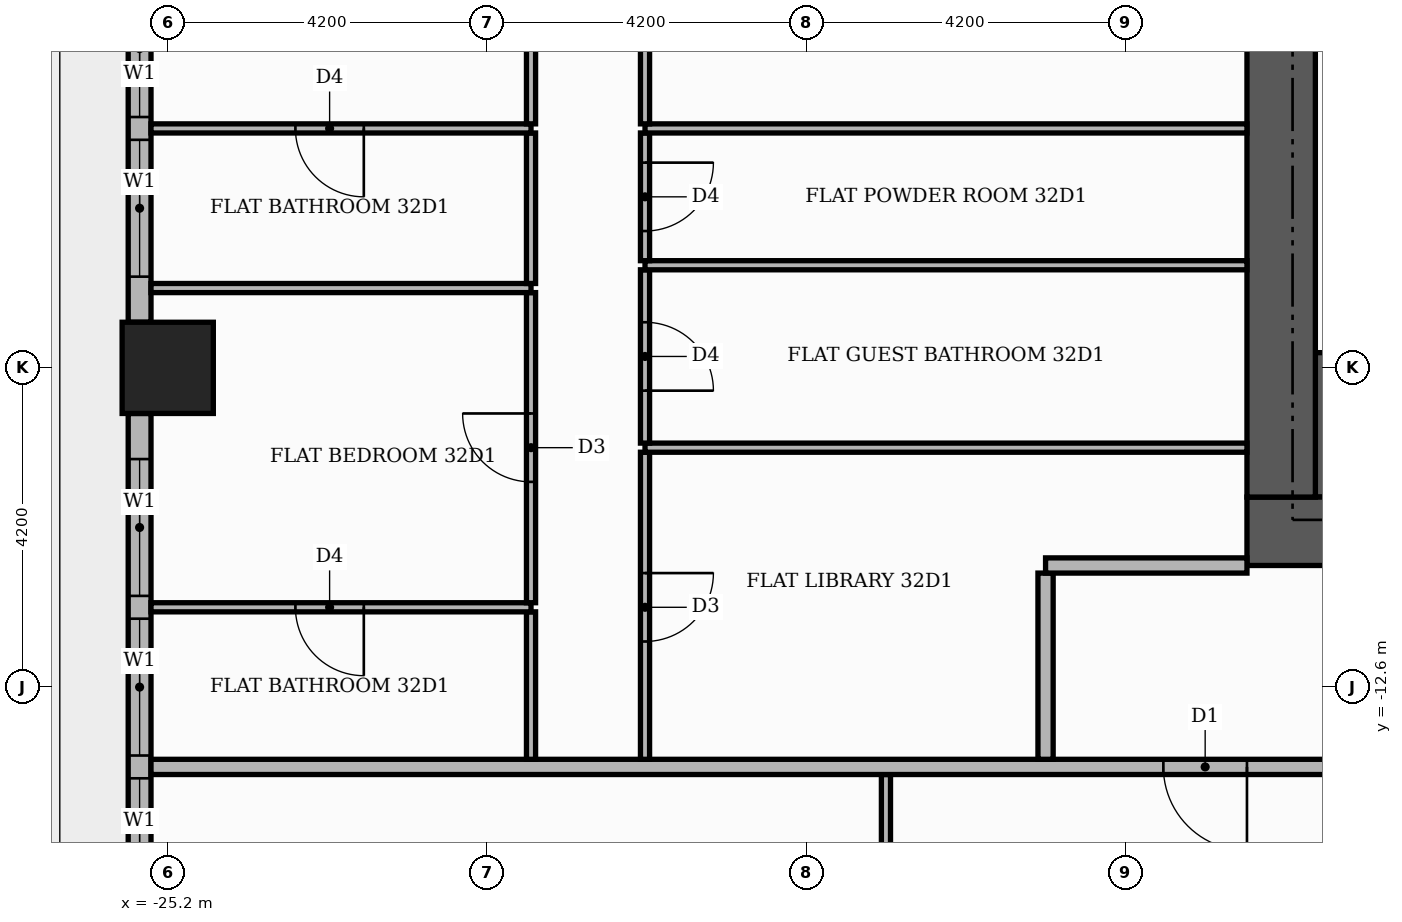
"""IFC4 building model, lengths in metres.
Left out: names, types, materials, properties, quantities, classifications, styles, units other than length and angle.
Written with IfcOpenShell. Run it as: python <this file> out.ifc"""

import sys

from ifc_helpers import new_model, si_unit, direction, frame, frame_2d, origin, origin_2d, place, context, subcontext, project, spatial, rectangle, extrude, element, fill, save


model = new_model("IFC4")
c1 = context("Model", 3, precision=1e-05, world=origin(), true_north=direction((0.0, 1.0)))
c2 = subcontext(c1, "Body", "Model", "MODEL_VIEW")
j1 = project(units=[si_unit("LENGTHUNIT", "METRE"), si_unit("PLANEANGLEUNIT", "RADIAN")], contexts=[c1])
p1 = place(None, origin())
s1 = spatial("IfcSite", under=j1, at=p1, CompositionType="ELEMENT")
p2 = place(p1, origin())
s2 = spatial("IfcBuilding", under=s1, at=p2, CompositionType="ELEMENT")
p3 = place(p2, frame((0.0, 0.0, 137.7)))
s3 = spatial("IfcBuildingStorey", under=s2, at=p3, CompositionType="ELEMENT", Elevation=137.7)
p4 = place(p3, frame((-10.1, -9.15, 0.0), z_axis=(0.0, 0.0, 1.0), x_axis=(1.0, 0.0, 0.0)))
e1 = element("IfcWall", 1, at=p4, inside=s3, PredefinedType="SHEAR", context=c2, shape_type="SweptSolid", body=[
    extrude(rectangle(XDim=4.6, YDim=1.9, at=frame_2d((2.3, 0.0))), origin(), (0.0, 0.0, 1.0), 3.48),
])
p5 = place(p3, frame((-11.0, -10.55, 0.0), z_axis=(0.0, 0.0, 1.0), x_axis=(1.0, 0.0, 0.0)))
e2 = element("IfcWall", 2, at=p5, inside=s3, PredefinedType="SHEAR", context=c2, shape_type="SweptSolid", body=[
    extrude(rectangle(XDim=22.0, YDim=0.9, at=frame_2d((11.0, 0.0))), origin(), (0.0, 0.0, 1.0), 3.48),
])
p6 = place(p5, frame((7.4, 0.0, 0.0)))
e3 = element("IfcOpeningElement", 3, at=p6, cuts=e2, PredefinedType="OPENING", context=c2, shape_type="SweptSolid", body=[
    extrude(rectangle(XDim=1.8, YDim=2.2, at=frame_2d((0.9, 1.1))), frame((0.0, 0.46, 0.0), z_axis=(0.0, -1.0, 0.0), x_axis=(1.0, 0.0, 0.0)), (0.0, 0.0, 1.0), 0.92),
])
p7 = place(p3, frame((-10.55, -10.1, 0.0), z_axis=(0.0, 0.0, 1.0), x_axis=(0.0, 1.0, 0.0)))
e4 = element("IfcWall", 4, at=p7, inside=s3, PredefinedType="SHEAR", context=c2, shape_type="SweptSolid", body=[
    extrude(rectangle(XDim=20.2, YDim=0.9, at=frame_2d((10.1, 0.0))), origin(), (0.0, 0.0, 1.0), 3.48),
])
p8 = place(p3, frame((-25.2, -8.4, 0.0), z_axis=(0.0, 0.0, 1.0), x_axis=(1.0, 0.0, 0.0)))
e5 = element("IfcColumn", 5, at=p8, inside=s3, PredefinedType="COLUMN", context=c2, shape_type="SweptSolid", body=[
    extrude(rectangle(XDim=1.2, YDim=1.2, at=origin_2d()), origin(), (0.0, 0.0, 1.0), 3.9),
])
p9 = place(p3, frame((-25.57, -0.6, 0.0), z_axis=(0.0, 0.0, 1.0), x_axis=(0.0, -1.0, 0.0)))
e6 = element("IfcWall", 6, at=p9, inside=s3, PredefinedType="STANDARD", context=c2, shape_type="SweptSolid", body=[
    extrude(rectangle(XDim=7.2, YDim=0.3, at=frame_2d((3.6, 0.0))), origin(), (0.0, 0.0, 1.0), 3.48),
])
p10 = place(p9, frame((0.6, 0.0, 0.0)))
e7 = element("IfcOpeningElement", 7, at=p10, cuts=e6, PredefinedType="OPENING", context=c2, shape_type="SweptSolid", body=[
    extrude(rectangle(XDim=1.8, YDim=2.4, at=frame_2d((0.9, 1.2))), frame((0.0, 0.16, 0.0), z_axis=(0.0, -1.0, 0.0), x_axis=(1.0, 0.0, 0.0)), (0.0, 0.0, 1.0), 0.32),
])
p11 = place(p9, frame((2.7, 0.0, 0.9)))
e8 = element("IfcOpeningElement", 8, at=p11, cuts=e6, PredefinedType="OPENING", context=c2, shape_type="SweptSolid", body=[
    extrude(rectangle(XDim=1.8, YDim=2.1, at=frame_2d((0.9, 1.05))), frame((0.0, 0.16, 0.0), z_axis=(0.0, -1.0, 0.0), x_axis=(1.0, 0.0, 0.0)), (0.0, 0.0, 1.0), 0.32),
])
p12 = place(p9, frame((4.8, 0.0, 0.9)))
e9 = element("IfcOpeningElement", 9, at=p12, cuts=e6, PredefinedType="OPENING", context=c2, shape_type="SweptSolid", body=[
    extrude(rectangle(XDim=1.8, YDim=2.1, at=frame_2d((0.9, 1.05))), frame((0.0, 0.16, 0.0), z_axis=(0.0, -1.0, 0.0), x_axis=(1.0, 0.0, 0.0)), (0.0, 0.0, 1.0), 0.32),
])
p13 = place(p3, frame((-25.57, -9.0, 0.0), z_axis=(0.0, 0.0, 1.0), x_axis=(0.0, -1.0, 0.0)))
e10 = element("IfcWall", 10, at=p13, inside=s3, PredefinedType="STANDARD", context=c2, shape_type="SweptSolid", body=[
    extrude(rectangle(XDim=7.2, YDim=0.3, at=frame_2d((3.6, 0.0))), origin(), (0.0, 0.0, 1.0), 3.48),
])
p14 = place(p13, frame((0.6, 0.0, 0.9)))
e11 = element("IfcOpeningElement", 11, at=p14, cuts=e10, PredefinedType="OPENING", context=c2, shape_type="SweptSolid", body=[
    extrude(rectangle(XDim=1.8, YDim=2.1, at=frame_2d((0.9, 1.05))), frame((0.0, 0.16, 0.0), z_axis=(0.0, -1.0, 0.0), x_axis=(1.0, 0.0, 0.0)), (0.0, 0.0, 1.0), 0.32),
])
p15 = place(p13, frame((2.7, 0.0, 0.9)))
e12 = element("IfcOpeningElement", 12, at=p15, cuts=e10, PredefinedType="OPENING", context=c2, shape_type="SweptSolid", body=[
    extrude(rectangle(XDim=1.8, YDim=2.1, at=frame_2d((0.9, 1.05))), frame((0.0, 0.16, 0.0), z_axis=(0.0, -1.0, 0.0), x_axis=(1.0, 0.0, 0.0)), (0.0, 0.0, 1.0), 0.32),
])
p16 = place(p13, frame((4.8, 0.0, 0.9)))
e13 = element("IfcOpeningElement", 13, at=p16, cuts=e10, PredefinedType="OPENING", context=c2, shape_type="SweptSolid", body=[
    extrude(rectangle(XDim=1.8, YDim=2.1, at=frame_2d((0.9, 1.05))), frame((0.0, 0.16, 0.0), z_axis=(0.0, -1.0, 0.0), x_axis=(1.0, 0.0, 0.0)), (0.0, 0.0, 1.0), 0.32),
])
p17 = place(p3, frame((-15.75, -19.76, 0.0), z_axis=(0.0, 0.0, 1.0), x_axis=(0.0, 1.0, 0.0)))
e14 = element("IfcWall", 14, at=p17, inside=s3, PredefinedType="PARTITIONING", context=c2, shape_type="SweptSolid", body=[
    extrude(rectangle(XDim=6.01, YDim=0.12, at=frame_2d((3.005, 0.0))), origin(), (0.0, 0.0, 1.0), 3.48),
])
p18 = place(p17, frame((2.525, 0.0, 0.0)))
e15 = element("IfcOpeningElement", 15, at=p18, cuts=e14, PredefinedType="OPENING", context=c2, shape_type="SweptSolid", body=[
    extrude(rectangle(XDim=1.0, YDim=2.1, at=frame_2d((0.5, 1.05))), frame((0.0, 0.07, 0.0), z_axis=(0.0, -1.0, 0.0), x_axis=(1.0, 0.0, 0.0)), (0.0, 0.0, 1.0), 0.14),
])
p19 = place(p3, frame((-25.42, -13.65, 0.0), z_axis=(0.0, 0.0, 1.0), x_axis=(1.0, 0.0, 0.0)))
e16 = element("IfcWall", 16, at=p19, inside=s3, PredefinedType="PARTITIONING", context=c2, shape_type="SweptSolid", body=[
    extrude(rectangle(XDim=39.07, YDim=0.2, at=frame_2d((19.535, 0.0))), origin(), (0.0, 0.0, 1.0), 3.48),
])
p20 = place(p19, frame((13.32, 0.0, 0.0)))
e17 = element("IfcOpeningElement", 17, at=p20, cuts=e16, PredefinedType="OPENING", context=c2, shape_type="SweptSolid", body=[
    extrude(rectangle(XDim=1.1, YDim=2.4, at=frame_2d((0.55, 1.2))), frame((0.0, 0.11, 0.0), z_axis=(0.0, -1.0, 0.0), x_axis=(1.0, 0.0, 0.0)), (0.0, 0.0, 1.0), 0.22),
])
p21 = place(p19, frame((25.92, 0.0, 0.0)))
e18 = element("IfcOpeningElement", 18, at=p21, cuts=e16, PredefinedType="OPENING", context=c2, shape_type="SweptSolid", body=[
    extrude(rectangle(XDim=1.1, YDim=2.4, at=frame_2d((0.55, 1.2))), frame((0.0, 0.11, 0.0), z_axis=(0.0, -1.0, 0.0), x_axis=(1.0, 0.0, 0.0)), (0.0, 0.0, 1.0), 0.22),
])
p22 = place(p3, frame((-20.42, -13.55, 0.0), z_axis=(0.0, 0.0, 1.0), x_axis=(0.0, 1.0, 0.0)))
e19 = element("IfcWall", 19, at=p22, inside=s3, PredefinedType="PARTITIONING", context=c2, shape_type="SweptSolid", body=[
    extrude(rectangle(XDim=1.94, YDim=0.12, at=frame_2d((0.97, 0.0))), origin(), (0.0, 0.0, 1.0), 3.48),
])
p23 = place(p3, frame((-18.92, -13.55, 0.0), z_axis=(0.0, 0.0, 1.0), x_axis=(0.0, 1.0, 0.0)))
e20 = element("IfcWall", 20, at=p23, inside=s3, PredefinedType="PARTITIONING", context=c2, shape_type="SweptSolid", body=[
    extrude(rectangle(XDim=4.04, YDim=0.12, at=frame_2d((2.02, 0.0))), origin(), (0.0, 0.0, 1.0), 3.48),
])
p24 = place(p23, frame((1.55, 0.0, 0.0)))
e21 = element("IfcOpeningElement", 21, at=p24, cuts=e20, PredefinedType="OPENING", context=c2, shape_type="SweptSolid", body=[
    extrude(rectangle(XDim=0.9, YDim=2.1, at=frame_2d((0.45, 1.05))), frame((0.0, 0.07, 0.0), z_axis=(0.0, -1.0, 0.0), x_axis=(1.0, 0.0, 0.0)), (0.0, 0.0, 1.0), 0.14),
])
p25 = place(p3, frame((-13.65, -13.55, 0.0), z_axis=(0.0, 0.0, 1.0), x_axis=(0.0, 1.0, 0.0)))
e22 = element("IfcWall", 22, at=p25, inside=s3, PredefinedType="PARTITIONING", context=c2, shape_type="SweptSolid", body=[
    extrude(rectangle(XDim=2.45, YDim=0.2, at=frame_2d((1.225, 0.0))), origin(), (0.0, 0.0, 1.0), 3.48),
])
p26 = place(p3, frame((-25.42, -11.55, 0.0), z_axis=(0.0, 0.0, 1.0), x_axis=(1.0, 0.0, 0.0)))
e23 = element("IfcWall", 23, at=p26, inside=s3, PredefinedType="PARTITIONING", context=c2, shape_type="SweptSolid", body=[
    extrude(rectangle(XDim=5.0, YDim=0.12, at=frame_2d((2.5, 0.0))), origin(), (0.0, 0.0, 1.0), 3.48),
])
p27 = place(p26, frame((1.9, 0.0, 0.0)))
e24 = element("IfcOpeningElement", 24, at=p27, cuts=e23, PredefinedType="OPENING", context=c2, shape_type="SweptSolid", body=[
    extrude(rectangle(XDim=0.9, YDim=2.1, at=frame_2d((0.45, 1.05))), frame((0.0, 0.07, 0.0), z_axis=(0.0, -1.0, 0.0), x_axis=(1.0, 0.0, 0.0)), (0.0, 0.0, 1.0), 0.14),
])
p28 = place(p3, frame((-20.42, -11.49, 0.0), z_axis=(0.0, 0.0, 1.0), x_axis=(0.0, 1.0, 0.0)))
e25 = element("IfcWall", 25, at=p28, inside=s3, PredefinedType="PARTITIONING", context=c2, shape_type="SweptSolid", body=[
    extrude(rectangle(XDim=4.08, YDim=0.12, at=frame_2d((2.04, 0.0))), origin(), (0.0, 0.0, 1.0), 3.48),
])
p29 = place(p28, frame((1.59, 0.0, 0.0)))
e26 = element("IfcOpeningElement", 26, at=p29, cuts=e25, PredefinedType="OPENING", context=c2, shape_type="SweptSolid", body=[
    extrude(rectangle(XDim=0.9, YDim=2.1, at=frame_2d((0.45, 1.05))), frame((0.0, 0.07, 0.0), z_axis=(0.0, -1.0, 0.0), x_axis=(1.0, 0.0, 0.0)), (0.0, 0.0, 1.0), 0.14),
])
p30 = place(p3, frame((-13.65, -11.0, 0.0), z_axis=(0.0, 0.0, 1.0), x_axis=(1.0, 0.0, 0.0)))
e27 = element("IfcWall", 27, at=p30, inside=s3, PredefinedType="PARTITIONING", context=c2, shape_type="SweptSolid", body=[
    extrude(rectangle(XDim=2.65, YDim=0.2, at=frame_2d((1.325, 0.0))), origin(), (0.0, 0.0, 1.0), 3.48),
])
p31 = place(p3, frame((-18.92, -9.45, 0.0), z_axis=(0.0, 0.0, 1.0), x_axis=(1.0, 0.0, 0.0)))
e28 = element("IfcWall", 28, at=p31, inside=s3, PredefinedType="PARTITIONING", context=c2, shape_type="SweptSolid", body=[
    extrude(rectangle(XDim=7.92, YDim=0.12, at=frame_2d((3.96, 0.0))), origin(), (0.0, 0.0, 1.0), 3.48),
])
p32 = place(p3, frame((-18.92, -9.39, 0.0), z_axis=(0.0, 0.0, 1.0), x_axis=(0.0, 1.0, 0.0)))
e29 = element("IfcWall", 29, at=p32, inside=s3, PredefinedType="PARTITIONING", context=c2, shape_type="SweptSolid", body=[
    extrude(rectangle(XDim=2.28, YDim=0.12, at=frame_2d((1.14, 0.0))), origin(), (0.0, 0.0, 1.0), 3.48),
])
p33 = place(p32, frame((0.69, 0.0, 0.0)))
e30 = element("IfcOpeningElement", 30, at=p33, cuts=e29, PredefinedType="OPENING", context=c2, shape_type="SweptSolid", body=[
    extrude(rectangle(XDim=0.9, YDim=2.1, at=frame_2d((0.45, 1.05))), frame((0.0, 0.07, 0.0), z_axis=(0.0, -1.0, 0.0), x_axis=(1.0, 0.0, 0.0)), (0.0, 0.0, 1.0), 0.14),
])
p34 = place(p3, frame((-25.42, -7.35, 0.0), z_axis=(0.0, 0.0, 1.0), x_axis=(1.0, 0.0, 0.0)))
e31 = element("IfcWall", 31, at=p34, inside=s3, PredefinedType="PARTITIONING", context=c2, shape_type="SweptSolid", body=[
    extrude(rectangle(XDim=5.0, YDim=0.12, at=frame_2d((2.5, 0.0))), origin(), (0.0, 0.0, 1.0), 3.48),
])
p35 = place(p3, frame((-20.42, -7.29, 0.0), z_axis=(0.0, 0.0, 1.0), x_axis=(0.0, 1.0, 0.0)))
e32 = element("IfcWall", 32, at=p35, inside=s3, PredefinedType="PARTITIONING", context=c2, shape_type="SweptSolid", body=[
    extrude(rectangle(XDim=1.98, YDim=0.12, at=frame_2d((0.99, 0.0))), origin(), (0.0, 0.0, 1.0), 3.48),
])
p36 = place(p3, frame((-18.92, -7.05, 0.0), z_axis=(0.0, 0.0, 1.0), x_axis=(1.0, 0.0, 0.0)))
e33 = element("IfcWall", 33, at=p36, inside=s3, PredefinedType="PARTITIONING", context=c2, shape_type="SweptSolid", body=[
    extrude(rectangle(XDim=7.92, YDim=0.12, at=frame_2d((3.96, 0.0))), origin(), (0.0, 0.0, 1.0), 3.48),
])
p37 = place(p3, frame((-18.92, -6.99, 0.0), z_axis=(0.0, 0.0, 1.0), x_axis=(0.0, 1.0, 0.0)))
e34 = element("IfcWall", 34, at=p37, inside=s3, PredefinedType="PARTITIONING", context=c2, shape_type="SweptSolid", body=[
    extrude(rectangle(XDim=1.68, YDim=0.12, at=frame_2d((0.84, 0.0))), origin(), (0.0, 0.0, 1.0), 3.48),
])
p38 = place(p37, frame((0.39, 0.0, 0.0)))
e35 = element("IfcOpeningElement", 35, at=p38, cuts=e34, PredefinedType="OPENING", context=c2, shape_type="SweptSolid", body=[
    extrude(rectangle(XDim=0.9, YDim=2.1, at=frame_2d((0.45, 1.05))), frame((0.0, 0.07, 0.0), z_axis=(0.0, -1.0, 0.0), x_axis=(1.0, 0.0, 0.0)), (0.0, 0.0, 1.0), 0.14),
])
p39 = place(p3, frame((-25.42, -5.25, 0.0), z_axis=(0.0, 0.0, 1.0), x_axis=(1.0, 0.0, 0.0)))
e36 = element("IfcWall", 36, at=p39, inside=s3, PredefinedType="PARTITIONING", context=c2, shape_type="SweptSolid", body=[
    extrude(rectangle(XDim=5.0, YDim=0.12, at=frame_2d((2.5, 0.0))), origin(), (0.0, 0.0, 1.0), 3.48),
])
p40 = place(p39, frame((1.9, 0.0, 0.0)))
e37 = element("IfcOpeningElement", 37, at=p40, cuts=e36, PredefinedType="OPENING", context=c2, shape_type="SweptSolid", body=[
    extrude(rectangle(XDim=0.9, YDim=2.1, at=frame_2d((0.45, 1.05))), frame((0.0, 0.07, 0.0), z_axis=(0.0, -1.0, 0.0), x_axis=(1.0, 0.0, 0.0)), (0.0, 0.0, 1.0), 0.14),
])
p41 = place(p3, frame((-18.92, -5.25, 0.0), z_axis=(0.0, 0.0, 1.0), x_axis=(1.0, 0.0, 0.0)))
e38 = element("IfcWall", 38, at=p41, inside=s3, PredefinedType="PARTITIONING", context=c2, shape_type="SweptSolid", body=[
    extrude(rectangle(XDim=7.92, YDim=0.12, at=frame_2d((3.96, 0.0))), origin(), (0.0, 0.0, 1.0), 3.48),
])
p42 = place(p3, frame((-20.42, -5.19, 0.0), z_axis=(0.0, 0.0, 1.0), x_axis=(0.0, 1.0, 0.0)))
e39 = element("IfcWall", 39, at=p42, inside=s3, PredefinedType="PARTITIONING", context=c2, shape_type="SweptSolid", body=[
    extrude(rectangle(XDim=1.98, YDim=0.12, at=frame_2d((0.99, 0.0))), origin(), (0.0, 0.0, 1.0), 3.48),
])
p43 = place(p3, frame((-18.92, -5.19, 0.0), z_axis=(0.0, 0.0, 1.0), x_axis=(0.0, 1.0, 0.0)))
e40 = element("IfcWall", 40, at=p43, inside=s3, PredefinedType="PARTITIONING", context=c2, shape_type="SweptSolid", body=[
    extrude(rectangle(XDim=4.08, YDim=0.12, at=frame_2d((2.04, 0.0))), origin(), (0.0, 0.0, 1.0), 3.48),
])
p44 = place(p43, frame((1.59, 0.0, 0.0)))
e41 = element("IfcOpeningElement", 41, at=p44, cuts=e40, PredefinedType="OPENING", context=c2, shape_type="SweptSolid", body=[
    extrude(rectangle(XDim=0.9, YDim=2.1, at=frame_2d((0.45, 1.05))), frame((0.0, 0.07, 0.0), z_axis=(0.0, -1.0, 0.0), x_axis=(1.0, 0.0, 0.0)), (0.0, 0.0, 1.0), 0.14),
])
p45 = place(p11, origin())
e42 = element("IfcWindow", 42, at=p45, inside=s3, PartitioningType="SINGLE_PANEL", PredefinedType="WINDOW", context=c2, shape_type="SweptSolid", body=[
    extrude(rectangle(XDim=1.8, YDim=2.1, at=frame_2d((0.9, 1.05))), frame((0.0, 0.03, 0.0), z_axis=(0.0, -1.0, 0.0), x_axis=(1.0, 0.0, 0.0)), (0.0, 0.0, 1.0), 0.06),
])
fill(e8, e42)
p46 = place(p12, origin())
e43 = element("IfcWindow", 43, at=p46, inside=s3, PartitioningType="SINGLE_PANEL", PredefinedType="WINDOW", context=c2, shape_type="SweptSolid", body=[
    extrude(rectangle(XDim=1.8, YDim=2.1, at=frame_2d((0.9, 1.05))), frame((0.0, 0.03, 0.0), z_axis=(0.0, -1.0, 0.0), x_axis=(1.0, 0.0, 0.0)), (0.0, 0.0, 1.0), 0.06),
])
fill(e9, e43)
p47 = place(p14, origin())
e44 = element("IfcWindow", 44, at=p47, inside=s3, PartitioningType="SINGLE_PANEL", PredefinedType="WINDOW", context=c2, shape_type="SweptSolid", body=[
    extrude(rectangle(XDim=1.8, YDim=2.1, at=frame_2d((0.9, 1.05))), frame((0.0, 0.03, 0.0), z_axis=(0.0, -1.0, 0.0), x_axis=(1.0, 0.0, 0.0)), (0.0, 0.0, 1.0), 0.06),
])
fill(e11, e44)
p48 = place(p15, origin())
e45 = element("IfcWindow", 45, at=p48, inside=s3, PartitioningType="SINGLE_PANEL", PredefinedType="WINDOW", context=c2, shape_type="SweptSolid", body=[
    extrude(rectangle(XDim=1.8, YDim=2.1, at=frame_2d((0.9, 1.05))), frame((0.0, 0.03, 0.0), z_axis=(0.0, -1.0, 0.0), x_axis=(1.0, 0.0, 0.0)), (0.0, 0.0, 1.0), 0.06),
])
fill(e12, e45)
p49 = place(p16, origin())
e46 = element("IfcWindow", 46, at=p49, inside=s3, PartitioningType="SINGLE_PANEL", PredefinedType="WINDOW", context=c2, shape_type="SweptSolid", body=[
    extrude(rectangle(XDim=1.8, YDim=2.1, at=frame_2d((0.9, 1.05))), frame((0.0, 0.03, 0.0), z_axis=(0.0, -1.0, 0.0), x_axis=(1.0, 0.0, 0.0)), (0.0, 0.0, 1.0), 0.06),
])
fill(e13, e46)
p50 = place(p20, frame((1.1, 0.0, 0.0), z_axis=(0.0, 0.0, 1.0), x_axis=(-1.0, 0.0, 0.0)))
e47 = element("IfcDoor", 47, at=p50, inside=s3, OperationType="SINGLE_SWING_RIGHT", PredefinedType="DOOR", context=c2, shape_type="SweptSolid", body=[
    extrude(rectangle(XDim=1.1, YDim=2.4, at=frame_2d((0.55, 1.2))), frame((0.0, 0.025, 0.0), z_axis=(0.0, -1.0, 0.0), x_axis=(1.0, 0.0, 0.0)), (0.0, 0.0, 1.0), 0.05),
])
fill(e17, e47)
p51 = place(p38, frame((0.9, 0.0, 0.0), z_axis=(0.0, 0.0, 1.0), x_axis=(-1.0, 0.0, 0.0)))
e48 = element("IfcDoor", 48, at=p51, inside=s3, OperationType="SINGLE_SWING_RIGHT", PredefinedType="DOOR", context=c2, shape_type="SweptSolid", body=[
    extrude(rectangle(XDim=0.9, YDim=2.1, at=frame_2d((0.45, 1.05))), frame((0.0, 0.025, 0.0), z_axis=(0.0, -1.0, 0.0), x_axis=(1.0, 0.0, 0.0)), (0.0, 0.0, 1.0), 0.05),
])
fill(e35, e48)
p52 = place(p33, frame((0.9, 0.0, 0.0), z_axis=(0.0, 0.0, 1.0), x_axis=(-1.0, 0.0, 0.0)))
e49 = element("IfcDoor", 49, at=p52, inside=s3, OperationType="SINGLE_SWING_LEFT", PredefinedType="DOOR", context=c2, shape_type="SweptSolid", body=[
    extrude(rectangle(XDim=0.9, YDim=2.1, at=frame_2d((0.45, 1.05))), frame((0.0, 0.025, 0.0), z_axis=(0.0, -1.0, 0.0), x_axis=(1.0, 0.0, 0.0)), (0.0, 0.0, 1.0), 0.05),
])
fill(e30, e49)
p53 = place(p24, frame((0.9, 0.0, 0.0), z_axis=(0.0, 0.0, 1.0), x_axis=(-1.0, 0.0, 0.0)))
e50 = element("IfcDoor", 50, at=p53, inside=s3, OperationType="SINGLE_SWING_RIGHT", PredefinedType="DOOR", context=c2, shape_type="SweptSolid", body=[
    extrude(rectangle(XDim=0.9, YDim=2.1, at=frame_2d((0.45, 1.05))), frame((0.0, 0.025, 0.0), z_axis=(0.0, -1.0, 0.0), x_axis=(1.0, 0.0, 0.0)), (0.0, 0.0, 1.0), 0.05),
])
fill(e21, e50)
p54 = place(p40, frame((0.9, 0.0, 0.0), z_axis=(0.0, 0.0, 1.0), x_axis=(-1.0, 0.0, 0.0)))
e51 = element("IfcDoor", 51, at=p54, inside=s3, OperationType="SINGLE_SWING_RIGHT", PredefinedType="DOOR", context=c2, shape_type="SweptSolid", body=[
    extrude(rectangle(XDim=0.9, YDim=2.1, at=frame_2d((0.45, 1.05))), frame((0.0, 0.025, 0.0), z_axis=(0.0, -1.0, 0.0), x_axis=(1.0, 0.0, 0.0)), (0.0, 0.0, 1.0), 0.05),
])
fill(e37, e51)
p55 = place(p29, origin())
e52 = element("IfcDoor", 52, at=p55, inside=s3, OperationType="SINGLE_SWING_RIGHT", PredefinedType="DOOR", context=c2, shape_type="SweptSolid", body=[
    extrude(rectangle(XDim=0.9, YDim=2.1, at=frame_2d((0.45, 1.05))), frame((0.0, 0.025, 0.0), z_axis=(0.0, -1.0, 0.0), x_axis=(1.0, 0.0, 0.0)), (0.0, 0.0, 1.0), 0.05),
])
fill(e26, e52)
p56 = place(p27, frame((0.9, 0.0, 0.0), z_axis=(0.0, 0.0, 1.0), x_axis=(-1.0, 0.0, 0.0)))
e53 = element("IfcDoor", 53, at=p56, inside=s3, OperationType="SINGLE_SWING_RIGHT", PredefinedType="DOOR", context=c2, shape_type="SweptSolid", body=[
    extrude(rectangle(XDim=0.9, YDim=2.1, at=frame_2d((0.45, 1.05))), frame((0.0, 0.025, 0.0), z_axis=(0.0, -1.0, 0.0), x_axis=(1.0, 0.0, 0.0)), (0.0, 0.0, 1.0), 0.05),
])
fill(e24, e53)
save(model, sys.argv[1])
